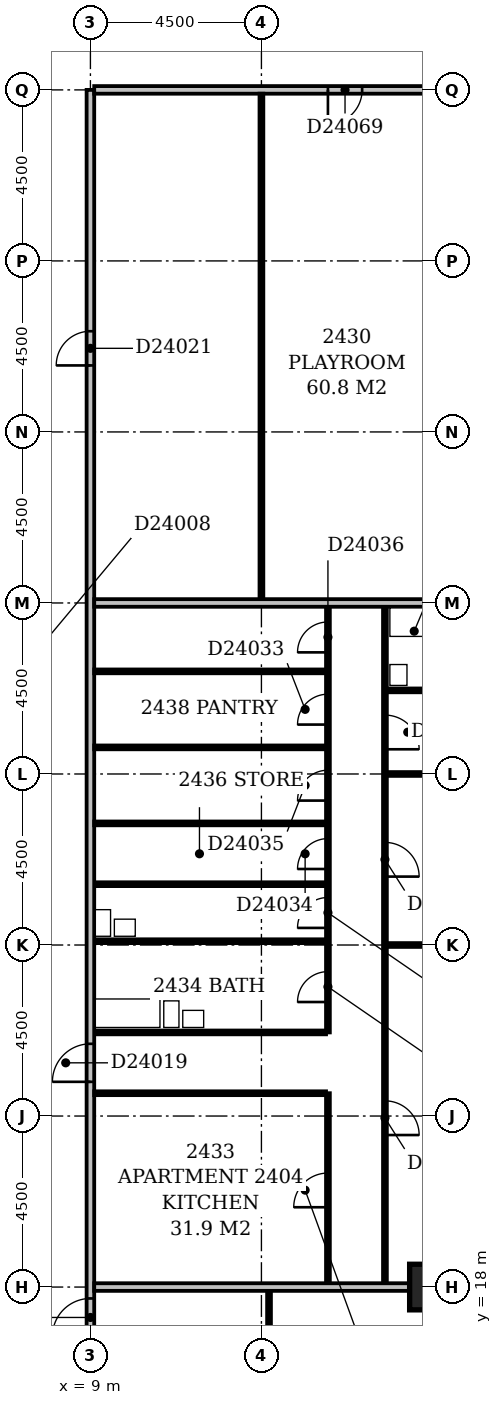
"""IFC4 building model, lengths in metres.
Left out: names, types, materials, properties, quantities, classifications, styles, units other than length and angle.
Written with IfcOpenShell. Run it as: python <this file> out.ifc"""

import sys

from ifc_helpers import new_model, si_unit, direction, frame, frame_2d, origin, origin_2d, place, context, subcontext, project, spatial, rectangle, extrude, element, fill, save


model = new_model("IFC4")
c1 = context("Model", 3, precision=1e-05, world=origin(), true_north=direction((0.0, 1.0)))
c2 = subcontext(c1, "Body", "Model", "MODEL_VIEW")
j1 = project(units=[si_unit("LENGTHUNIT", "METRE"), si_unit("PLANEANGLEUNIT", "RADIAN")], contexts=[c1])
p1 = place(None, origin())
s1 = spatial("IfcSite", under=j1, at=p1, CompositionType="ELEMENT")
p2 = place(p1, origin())
s2 = spatial("IfcBuilding", under=s1, at=p2, CompositionType="ELEMENT")
p3 = place(p2, frame((0.0, 0.0, 97.4)))
s3 = spatial("IfcBuildingStorey", under=s2, at=p3, CompositionType="ELEMENT", Elevation=97.4)
p4 = place(p3, frame((18.0, 18.0, -0.3), z_axis=(0.0, 0.0, 1.0), x_axis=(1.0, 0.0, 0.0)))
e1 = element("IfcColumn", 1, at=p4, inside=s3, PredefinedType="COLUMN", context=c2, shape_type="SweptSolid", body=[
    extrude(rectangle(XDim=1.2, YDim=1.2, at=origin_2d()), origin(), (0.0, 0.0, 1.0), 3.6),
])
p5 = place(p3, frame((9.0, 5.0, 0.0), z_axis=(0.0, 0.0, 1.0), x_axis=(0.0, 1.0, 0.0)))
e2 = element("IfcWall", 2, at=p5, inside=s3, PredefinedType="PARTITIONING", context=c2, shape_type="SweptSolid", body=[
    extrude(rectangle(XDim=44.5, YDim=0.2, at=frame_2d((22.25, 0.0))), origin(), (0.0, 0.0, 1.0), 3.3),
])
p6 = place(p5, frame((18.4, 0.0, 0.0)))
e3 = element("IfcOpeningElement", 3, at=p6, cuts=e2, PredefinedType="OPENING", context=c2, shape_type="SweptSolid", body=[
    extrude(rectangle(XDim=1.0, YDim=2.1, at=frame_2d((0.5, 1.05))), frame((0.0, 0.112, 0.0), z_axis=(0.0, -1.0, 0.0), x_axis=(1.0, 0.0, 0.0)), (0.0, 0.0, 1.0), 0.224),
])
p7 = place(p5, frame((11.7, 0.0, 0.0)))
e4 = element("IfcOpeningElement", 4, at=p7, cuts=e2, PredefinedType="OPENING", context=c2, shape_type="SweptSolid", body=[
    extrude(rectangle(XDim=1.0, YDim=2.1, at=frame_2d((0.5, 1.05))), frame((0.0, 0.112, 0.0), z_axis=(0.0, -1.0, 0.0), x_axis=(1.0, 0.0, 0.0)), (0.0, 0.0, 1.0), 0.224),
])
p8 = place(p5, frame((37.25, 0.0, 0.0)))
e5 = element("IfcOpeningElement", 5, at=p8, cuts=e2, PredefinedType="OPENING", context=c2, shape_type="SweptSolid", body=[
    extrude(rectangle(XDim=0.9, YDim=2.1, at=frame_2d((0.45, 1.05))), frame((0.0, 0.112, 0.0), z_axis=(0.0, -1.0, 0.0), x_axis=(1.0, 0.0, 0.0)), (0.0, 0.0, 1.0), 0.224),
])
p9 = place(p5, frame((1.5, 0.0, 0.0)))
e6 = element("IfcOpeningElement", 6, at=p9, cuts=e2, PredefinedType="OPENING", context=c2, shape_type="SweptSolid", body=[
    extrude(rectangle(XDim=0.9, YDim=2.1, at=frame_2d((0.45, 1.05))), frame((0.0, 0.112, 0.0), z_axis=(0.0, -1.0, 0.0), x_axis=(1.0, 0.0, 0.0)), (0.0, 0.0, 1.0), 0.224),
])
p10 = place(p3, frame((13.7, 9.6, 0.0), z_axis=(0.0, 0.0, 1.0), x_axis=(0.0, 1.0, 0.0)))
e7 = element("IfcWall", 7, at=p10, inside=s3, PredefinedType="PARTITIONING", context=c2, shape_type="SweptSolid", body=[
    extrude(rectangle(XDim=8.3, YDim=0.1, at=frame_2d((4.15, 0.0))), origin(), (0.0, 0.0, 1.0), 3.3),
])
p11 = place(p10, frame((1.2, 0.0, 0.0)))
e8 = element("IfcOpeningElement", 8, at=p11, cuts=e7, PredefinedType="OPENING", context=c2, shape_type="SweptSolid", body=[
    extrude(rectangle(XDim=0.9, YDim=2.1, at=frame_2d((0.45, 1.05))), frame((0.0, 0.062, 0.0), z_axis=(0.0, -1.0, 0.0), x_axis=(1.0, 0.0, 0.0)), (0.0, 0.0, 1.0), 0.124),
])
p12 = place(p10, frame((5.7, 0.0, 0.0)))
e9 = element("IfcOpeningElement", 9, at=p12, cuts=e7, PredefinedType="OPENING", context=c2, shape_type="SweptSolid", body=[
    extrude(rectangle(XDim=0.9, YDim=2.1, at=frame_2d((0.45, 1.05))), frame((0.0, 0.062, 0.0), z_axis=(0.0, -1.0, 0.0), x_axis=(1.0, 0.0, 0.0)), (0.0, 0.0, 1.0), 0.124),
])
p13 = place(p3, frame((9.1, 18.0, 0.0), z_axis=(0.0, 0.0, 1.0), x_axis=(1.0, 0.0, 0.0)))
e10 = element("IfcWall", 10, at=p13, inside=s3, PredefinedType="PARTITIONING", context=c2, shape_type="SweptSolid", body=[
    extrude(rectangle(XDim=8.3, YDim=0.2, at=frame_2d((4.15, 0.0))), origin(), (0.0, 0.0, 1.0), 2.6),
])
p14 = place(p3, frame((15.25, 18.1, 0.0), z_axis=(0.0, 0.0, 1.0), x_axis=(0.0, 1.0, 0.0)))
e11 = element("IfcWall", 11, at=p14, inside=s3, PredefinedType="PARTITIONING", context=c2, shape_type="SweptSolid", body=[
    extrude(rectangle(XDim=5.0, YDim=0.1, at=frame_2d((2.5, 0.0))), origin(), (0.0, 0.0, 1.0), 3.3),
])
p15 = place(p14, frame((2.0, 0.0, 0.0)))
e12 = element("IfcOpeningElement", 12, at=p15, cuts=e11, PredefinedType="OPENING", context=c2, shape_type="SweptSolid", body=[
    extrude(rectangle(XDim=0.9, YDim=2.1, at=frame_2d((0.45, 1.05))), frame((0.0, 0.062, 0.0), z_axis=(0.0, -1.0, 0.0), x_axis=(1.0, 0.0, 0.0)), (0.0, 0.0, 1.0), 0.124),
])
p16 = place(p3, frame((16.75, 18.1, 0.0), z_axis=(0.0, 0.0, 1.0), x_axis=(0.0, 1.0, 0.0)))
e13 = element("IfcWall", 13, at=p16, inside=s3, PredefinedType="PARTITIONING", context=c2, shape_type="SweptSolid", body=[
    extrude(rectangle(XDim=17.8, YDim=0.1, at=frame_2d((8.9, 0.0))), origin(), (0.0, 0.0, 1.0), 3.3),
])
p17 = place(p16, frame((3.9, 0.0, 0.0)))
e14 = element("IfcOpeningElement", 14, at=p17, cuts=e13, PredefinedType="OPENING", context=c2, shape_type="SweptSolid", body=[
    extrude(rectangle(XDim=0.9, YDim=2.1, at=frame_2d((0.45, 1.05))), frame((0.0, 0.062, 0.0), z_axis=(0.0, -1.0, 0.0), x_axis=(1.0, 0.0, 0.0)), (0.0, 0.0, 1.0), 0.124),
])
p18 = place(p16, frame((10.7, 0.0, 0.0)))
e15 = element("IfcOpeningElement", 15, at=p18, cuts=e13, PredefinedType="OPENING", context=c2, shape_type="SweptSolid", body=[
    extrude(rectangle(XDim=0.9, YDim=2.1, at=frame_2d((0.45, 1.05))), frame((0.0, 0.062, 0.0), z_axis=(0.0, -1.0, 0.0), x_axis=(1.0, 0.0, 0.0)), (0.0, 0.0, 1.0), 0.124),
])
p19 = place(p16, frame((14.05, 0.0, 0.0)))
e16 = element("IfcOpeningElement", 16, at=p19, cuts=e13, PredefinedType="OPENING", context=c2, shape_type="SweptSolid", body=[
    extrude(rectangle(XDim=0.9, YDim=2.1, at=frame_2d((0.45, 1.05))), frame((0.0, 0.062, 0.0), z_axis=(0.0, -1.0, 0.0), x_axis=(1.0, 0.0, 0.0)), (0.0, 0.0, 1.0), 0.124),
])
p20 = place(p3, frame((9.1, 23.1, 0.0), z_axis=(0.0, 0.0, 1.0), x_axis=(1.0, 0.0, 0.0)))
e17 = element("IfcWall", 17, at=p20, inside=s3, PredefinedType="PARTITIONING", context=c2, shape_type="SweptSolid", body=[
    extrude(rectangle(XDim=6.1, YDim=0.1, at=frame_2d((3.05, 0.0))), origin(), (0.0, 0.0, 1.0), 3.3),
])
p21 = place(p3, frame((9.1, 24.7, 0.0), z_axis=(0.0, 0.0, 1.0), x_axis=(1.0, 0.0, 0.0)))
e18 = element("IfcWall", 18, at=p21, inside=s3, PredefinedType="PLUMBINGWALL", context=c2, shape_type="SweptSolid", body=[
    extrude(rectangle(XDim=6.1, YDim=0.1, at=frame_2d((3.05, 0.0))), origin(), (0.0, 0.0, 1.0), 3.3),
])
p22 = place(p3, frame((15.25, 24.7, 0.0), z_axis=(0.0, 0.0, 1.0), x_axis=(0.0, 1.0, 0.0)))
e19 = element("IfcWall", 19, at=p22, inside=s3, PredefinedType="PARTITIONING", context=c2, shape_type="SweptSolid", body=[
    extrude(rectangle(XDim=11.2, YDim=0.1, at=frame_2d((5.6, 0.0))), origin(), (0.0, 0.0, 1.0), 3.3),
])
p23 = place(p22, frame((0.8, 0.0, 0.0)))
e20 = element("IfcOpeningElement", 20, at=p23, cuts=e19, PredefinedType="OPENING", context=c2, shape_type="SweptSolid", body=[
    extrude(rectangle(XDim=0.8, YDim=2.1, at=frame_2d((0.4, 1.05))), frame((0.0, 0.062, 0.0), z_axis=(0.0, -1.0, 0.0), x_axis=(1.0, 0.0, 0.0)), (0.0, 0.0, 1.0), 0.124),
])
p24 = place(p22, frame((8.1, 0.0, 0.0)))
e21 = element("IfcOpeningElement", 21, at=p24, cuts=e19, PredefinedType="OPENING", context=c2, shape_type="SweptSolid", body=[
    extrude(rectangle(XDim=0.8, YDim=2.1, at=frame_2d((0.4, 1.05))), frame((0.0, 0.062, 0.0), z_axis=(0.0, -1.0, 0.0), x_axis=(1.0, 0.0, 0.0)), (0.0, 0.0, 1.0), 0.124),
])
p25 = place(p22, frame((4.3, 0.0, 0.0)))
e22 = element("IfcOpeningElement", 22, at=p25, cuts=e19, PredefinedType="OPENING", context=c2, shape_type="SweptSolid", body=[
    extrude(rectangle(XDim=0.8, YDim=2.1, at=frame_2d((0.4, 1.05))), frame((0.0, 0.062, 0.0), z_axis=(0.0, -1.0, 0.0), x_axis=(1.0, 0.0, 0.0)), (0.0, 0.0, 1.0), 0.124),
])
p26 = place(p22, frame((6.1, 0.0, 0.0)))
e23 = element("IfcOpeningElement", 23, at=p26, cuts=e19, PredefinedType="OPENING", context=c2, shape_type="SweptSolid", body=[
    extrude(rectangle(XDim=0.8, YDim=2.1, at=frame_2d((0.4, 1.05))), frame((0.0, 0.062, 0.0), z_axis=(0.0, -1.0, 0.0), x_axis=(1.0, 0.0, 0.0)), (0.0, 0.0, 1.0), 0.124),
])
p27 = place(p22, frame((10.0, 0.0, 0.0)))
e24 = element("IfcOpeningElement", 24, at=p27, cuts=e19, PredefinedType="OPENING", context=c2, shape_type="SweptSolid", body=[
    extrude(rectangle(XDim=0.8, YDim=2.1, at=frame_2d((0.4, 1.05))), frame((0.0, 0.062, 0.0), z_axis=(0.0, -1.0, 0.0), x_axis=(1.0, 0.0, 0.0)), (0.0, 0.0, 1.0), 0.124),
])
p28 = place(p22, frame((2.75, 0.0, 0.0)))
e25 = element("IfcOpeningElement", 25, at=p28, cuts=e19, PredefinedType="OPENING", context=c2, shape_type="SweptSolid", body=[
    extrude(rectangle(XDim=0.8, YDim=2.1, at=frame_2d((0.4, 1.05))), frame((0.0, 0.062, 0.0), z_axis=(0.0, -1.0, 0.0), x_axis=(1.0, 0.0, 0.0)), (0.0, 0.0, 1.0), 0.124),
])
p29 = place(p3, frame((16.8, 27.0, 0.0), z_axis=(0.0, 0.0, 1.0), x_axis=(1.0, 0.0, 0.0)))
e26 = element("IfcWall", 26, at=p29, inside=s3, PredefinedType="PARTITIONING", context=c2, shape_type="SweptSolid", body=[
    extrude(rectangle(XDim=5.1, YDim=0.1, at=frame_2d((2.55, 0.0))), origin(), (0.0, 0.0, 1.0), 2.7),
])
p30 = place(p3, frame((9.1, 27.1, 0.0), z_axis=(0.0, 0.0, 1.0), x_axis=(1.0, 0.0, 0.0)))
e27 = element("IfcWall", 27, at=p30, inside=s3, PredefinedType="PLUMBINGWALL", context=c2, shape_type="SweptSolid", body=[
    extrude(rectangle(XDim=6.1, YDim=0.1, at=frame_2d((3.05, 0.0))), origin(), (0.0, 0.0, 1.0), 2.7),
])
p31 = place(p3, frame((9.1, 28.6, 0.0), z_axis=(0.0, 0.0, 1.0), x_axis=(1.0, 0.0, 0.0)))
e28 = element("IfcWall", 28, at=p31, inside=s3, PredefinedType="PLUMBINGWALL", context=c2, shape_type="SweptSolid", body=[
    extrude(rectangle(XDim=6.1, YDim=0.1, at=frame_2d((3.05, 0.0))), origin(), (0.0, 0.0, 1.0), 3.3),
])
p32 = place(p3, frame((9.1, 30.2, 0.0), z_axis=(0.0, 0.0, 1.0), x_axis=(1.0, 0.0, 0.0)))
e29 = element("IfcWall", 29, at=p32, inside=s3, PredefinedType="PARTITIONING", context=c2, shape_type="SweptSolid", body=[
    extrude(rectangle(XDim=6.1, YDim=0.1, at=frame_2d((3.05, 0.0))), origin(), (0.0, 0.0, 1.0), 3.3),
])
p33 = place(p3, frame((16.8, 31.5, 0.0), z_axis=(0.0, 0.0, 1.0), x_axis=(1.0, 0.0, 0.0)))
e30 = element("IfcWall", 30, at=p33, inside=s3, PredefinedType="PARTITIONING", context=c2, shape_type="SweptSolid", body=[
    extrude(rectangle(XDim=5.1, YDim=0.1, at=frame_2d((2.55, 0.0))), origin(), (0.0, 0.0, 1.0), 3.3),
])
p34 = place(p3, frame((9.1, 32.2, 0.0), z_axis=(0.0, 0.0, 1.0), x_axis=(1.0, 0.0, 0.0)))
e31 = element("IfcWall", 31, at=p34, inside=s3, PredefinedType="PARTITIONING", context=c2, shape_type="SweptSolid", body=[
    extrude(rectangle(XDim=6.1, YDim=0.1, at=frame_2d((3.05, 0.0))), origin(), (0.0, 0.0, 1.0), 3.3),
])
p35 = place(p3, frame((16.8, 33.7, 0.0), z_axis=(0.0, 0.0, 1.0), x_axis=(1.0, 0.0, 0.0)))
e32 = element("IfcWall", 32, at=p35, inside=s3, PredefinedType="PLUMBINGWALL", context=c2, shape_type="SweptSolid", body=[
    extrude(rectangle(XDim=2.8, YDim=0.1, at=frame_2d((1.4, 0.0))), origin(), (0.0, 0.0, 1.0), 3.3),
])
p36 = place(p35, frame((1.0, 0.0, 0.0)))
e33 = element("IfcOpeningElement", 33, at=p36, cuts=e32, PredefinedType="OPENING", context=c2, shape_type="SweptSolid", body=[
    extrude(rectangle(XDim=0.8, YDim=2.1, at=frame_2d((0.4, 1.05))), frame((0.0, 0.062, 0.0), z_axis=(0.0, -1.0, 0.0), x_axis=(1.0, 0.0, 0.0)), (0.0, 0.0, 1.0), 0.124),
])
p37 = place(p3, frame((9.1, 34.2, 0.0), z_axis=(0.0, 0.0, 1.0), x_axis=(1.0, 0.0, 0.0)))
e34 = element("IfcWall", 34, at=p37, inside=s3, PredefinedType="PARTITIONING", context=c2, shape_type="SweptSolid", body=[
    extrude(rectangle(XDim=6.1, YDim=0.1, at=frame_2d((3.05, 0.0))), origin(), (0.0, 0.0, 1.0), 3.3),
])
p38 = place(p3, frame((9.1, 36.0, 0.0), z_axis=(0.0, 0.0, 1.0), x_axis=(1.0, 0.0, 0.0)))
e35 = element("IfcWall", 35, at=p38, inside=s3, PredefinedType="PARTITIONING", context=c2, shape_type="SweptSolid", body=[
    extrude(rectangle(XDim=12.8, YDim=0.2, at=frame_2d((6.4, 0.0))), origin(), (0.0, 0.0, 1.0), 2.4),
])
p39 = place(p3, frame((13.5, 36.1, 0.0), z_axis=(0.0, 0.0, 1.0), x_axis=(0.0, 1.0, 0.0)))
e36 = element("IfcWall", 36, at=p39, inside=s3, PredefinedType="PARTITIONING", context=c2, shape_type="SweptSolid", body=[
    extrude(rectangle(XDim=13.3, YDim=0.1, at=frame_2d((6.65, 0.0))), origin(), (0.0, 0.0, 1.0), 3.3),
])
p40 = place(p3, frame((9.1, 49.5, 0.0), z_axis=(0.0, 0.0, 1.0), x_axis=(1.0, 0.0, 0.0)))
e37 = element("IfcWall", 37, at=p40, inside=s3, PredefinedType="PARTITIONING", context=c2, shape_type="SweptSolid", body=[
    extrude(rectangle(XDim=57.8, YDim=0.2, at=frame_2d((28.9, 0.0))), origin(), (0.0, 0.0, 1.0), 3.3),
])
p41 = place(p40, frame((13.7, 0.0, 0.0)))
e38 = element("IfcOpeningElement", 38, at=p41, cuts=e37, PredefinedType="OPENING", context=c2, shape_type="SweptSolid", body=[
    extrude(rectangle(XDim=1.0, YDim=2.1, at=frame_2d((0.5, 1.05))), frame((0.0, 0.112, 0.0), z_axis=(0.0, -1.0, 0.0), x_axis=(1.0, 0.0, 0.0)), (0.0, 0.0, 1.0), 0.224),
])
p42 = place(p40, frame((38.6, 0.0, 0.0)))
e39 = element("IfcOpeningElement", 39, at=p42, cuts=e37, PredefinedType="OPENING", context=c2, shape_type="SweptSolid", body=[
    extrude(rectangle(XDim=1.0, YDim=2.1, at=frame_2d((0.5, 1.05))), frame((0.0, 0.112, 0.0), z_axis=(0.0, -1.0, 0.0), x_axis=(1.0, 0.0, 0.0)), (0.0, 0.0, 1.0), 0.224),
])
p43 = place(p40, frame((52.1, 0.0, 0.0)))
e40 = element("IfcOpeningElement", 40, at=p43, cuts=e37, PredefinedType="OPENING", context=c2, shape_type="SweptSolid", body=[
    extrude(rectangle(XDim=1.0, YDim=2.1, at=frame_2d((0.5, 1.05))), frame((0.0, 0.112, 0.0), z_axis=(0.0, -1.0, 0.0), x_axis=(1.0, 0.0, 0.0)), (0.0, 0.0, 1.0), 0.224),
])
p44 = place(p40, frame((6.15, 0.0, 0.0)))
e41 = element("IfcOpeningElement", 41, at=p44, cuts=e37, PredefinedType="OPENING", context=c2, shape_type="SweptSolid", body=[
    extrude(rectangle(XDim=0.9, YDim=2.1, at=frame_2d((0.45, 1.05))), frame((0.0, 0.112, 0.0), z_axis=(0.0, -1.0, 0.0), x_axis=(1.0, 0.0, 0.0)), (0.0, 0.0, 1.0), 0.224),
])
p45 = place(p40, frame((10.65, 0.0, 0.0)))
e42 = element("IfcOpeningElement", 42, at=p45, cuts=e37, PredefinedType="OPENING", context=c2, shape_type="SweptSolid", body=[
    extrude(rectangle(XDim=0.9, YDim=2.1, at=frame_2d((0.45, 1.05))), frame((0.0, 0.112, 0.0), z_axis=(0.0, -1.0, 0.0), x_axis=(1.0, 0.0, 0.0)), (0.0, 0.0, 1.0), 0.224),
])
p46 = place(p6, origin())
e43 = element("IfcDoor", 43, at=p46, inside=s3, OperationType="SINGLE_SWING_LEFT", PredefinedType="DOOR", context=c2, shape_type="SweptSolid", body=[
    extrude(rectangle(XDim=1.0, YDim=2.1, at=frame_2d((0.5, 1.05))), frame((0.0, 0.025, 0.0), z_axis=(0.0, -1.0, 0.0), x_axis=(1.0, 0.0, 0.0)), (0.0, 0.0, 1.0), 0.05),
])
fill(e3, e43)
p47 = place(p7, origin())
e44 = element("IfcDoor", 44, at=p47, inside=s3, OperationType="SINGLE_SWING_LEFT", PredefinedType="DOOR", context=c2, shape_type="SweptSolid", body=[
    extrude(rectangle(XDim=1.0, YDim=2.1, at=frame_2d((0.5, 1.05))), frame((0.0, 0.025, 0.0), z_axis=(0.0, -1.0, 0.0), x_axis=(1.0, 0.0, 0.0)), (0.0, 0.0, 1.0), 0.05),
])
fill(e4, e44)
p48 = place(p8, origin())
e45 = element("IfcDoor", 45, at=p48, inside=s3, OperationType="SINGLE_SWING_LEFT", PredefinedType="DOOR", context=c2, shape_type="SweptSolid", body=[
    extrude(rectangle(XDim=0.9, YDim=2.1, at=frame_2d((0.45, 1.05))), frame((0.0, 0.025, 0.0), z_axis=(0.0, -1.0, 0.0), x_axis=(1.0, 0.0, 0.0)), (0.0, 0.0, 1.0), 0.05),
])
fill(e5, e45)
p49 = place(p15, origin())
e46 = element("IfcDoor", 46, at=p49, inside=s3, OperationType="SINGLE_SWING_LEFT", PredefinedType="DOOR", context=c2, shape_type="SweptSolid", body=[
    extrude(rectangle(XDim=0.9, YDim=2.1, at=frame_2d((0.45, 1.05))), frame((0.0, 0.025, 0.0), z_axis=(0.0, -1.0, 0.0), x_axis=(1.0, 0.0, 0.0)), (0.0, 0.0, 1.0), 0.05),
])
fill(e12, e46)
p50 = place(p17, frame((0.9, 0.0, 0.0), z_axis=(0.0, 0.0, 1.0), x_axis=(-1.0, 0.0, 0.0)))
e47 = element("IfcDoor", 47, at=p50, inside=s3, OperationType="SINGLE_SWING_RIGHT", PredefinedType="DOOR", context=c2, shape_type="SweptSolid", body=[
    extrude(rectangle(XDim=0.9, YDim=2.1, at=frame_2d((0.45, 1.05))), frame((0.0, 0.025, 0.0), z_axis=(0.0, -1.0, 0.0), x_axis=(1.0, 0.0, 0.0)), (0.0, 0.0, 1.0), 0.05),
])
fill(e14, e47)
p51 = place(p18, frame((0.9, 0.0, 0.0), z_axis=(0.0, 0.0, 1.0), x_axis=(-1.0, 0.0, 0.0)))
e48 = element("IfcDoor", 48, at=p51, inside=s3, OperationType="SINGLE_SWING_RIGHT", PredefinedType="DOOR", context=c2, shape_type="SweptSolid", body=[
    extrude(rectangle(XDim=0.9, YDim=2.1, at=frame_2d((0.45, 1.05))), frame((0.0, 0.025, 0.0), z_axis=(0.0, -1.0, 0.0), x_axis=(1.0, 0.0, 0.0)), (0.0, 0.0, 1.0), 0.05),
])
fill(e15, e48)
p52 = place(p19, frame((0.9, 0.0, 0.0), z_axis=(0.0, 0.0, 1.0), x_axis=(-1.0, 0.0, 0.0)))
e49 = element("IfcDoor", 49, at=p52, inside=s3, OperationType="SINGLE_SWING_RIGHT", PredefinedType="DOOR", context=c2, shape_type="SweptSolid", body=[
    extrude(rectangle(XDim=0.9, YDim=2.1, at=frame_2d((0.45, 1.05))), frame((0.0, 0.025, 0.0), z_axis=(0.0, -1.0, 0.0), x_axis=(1.0, 0.0, 0.0)), (0.0, 0.0, 1.0), 0.05),
])
fill(e16, e49)
p53 = place(p23, origin())
e50 = element("IfcDoor", 50, at=p53, inside=s3, OperationType="SINGLE_SWING_LEFT", PredefinedType="DOOR", context=c2, shape_type="SweptSolid", body=[
    extrude(rectangle(XDim=0.8, YDim=2.1, at=frame_2d((0.4, 1.05))), frame((0.0, 0.025, 0.0), z_axis=(0.0, -1.0, 0.0), x_axis=(1.0, 0.0, 0.0)), (0.0, 0.0, 1.0), 0.05),
])
fill(e20, e50)
p54 = place(p24, origin())
e51 = element("IfcDoor", 51, at=p54, inside=s3, OperationType="SINGLE_SWING_LEFT", PredefinedType="DOOR", context=c2, shape_type="SweptSolid", body=[
    extrude(rectangle(XDim=0.8, YDim=2.1, at=frame_2d((0.4, 1.05))), frame((0.0, 0.025, 0.0), z_axis=(0.0, -1.0, 0.0), x_axis=(1.0, 0.0, 0.0)), (0.0, 0.0, 1.0), 0.05),
])
fill(e21, e51)
p55 = place(p25, origin())
e52 = element("IfcDoor", 52, at=p55, inside=s3, OperationType="SINGLE_SWING_LEFT", PredefinedType="DOOR", context=c2, shape_type="SweptSolid", body=[
    extrude(rectangle(XDim=0.8, YDim=2.1, at=frame_2d((0.4, 1.05))), frame((0.0, 0.025, 0.0), z_axis=(0.0, -1.0, 0.0), x_axis=(1.0, 0.0, 0.0)), (0.0, 0.0, 1.0), 0.05),
])
fill(e22, e52)
p56 = place(p26, origin())
e53 = element("IfcDoor", 53, at=p56, inside=s3, OperationType="SINGLE_SWING_LEFT", PredefinedType="DOOR", context=c2, shape_type="SweptSolid", body=[
    extrude(rectangle(XDim=0.8, YDim=2.1, at=frame_2d((0.4, 1.05))), frame((0.0, 0.025, 0.0), z_axis=(0.0, -1.0, 0.0), x_axis=(1.0, 0.0, 0.0)), (0.0, 0.0, 1.0), 0.05),
])
fill(e23, e53)
p57 = place(p27, origin())
e54 = element("IfcDoor", 54, at=p57, inside=s3, OperationType="SINGLE_SWING_LEFT", PredefinedType="DOOR", context=c2, shape_type="SweptSolid", body=[
    extrude(rectangle(XDim=0.8, YDim=2.1, at=frame_2d((0.4, 1.05))), frame((0.0, 0.025, 0.0), z_axis=(0.0, -1.0, 0.0), x_axis=(1.0, 0.0, 0.0)), (0.0, 0.0, 1.0), 0.05),
])
fill(e24, e54)
p58 = place(p28, origin())
e55 = element("IfcDoor", 55, at=p58, inside=s3, OperationType="SINGLE_SWING_LEFT", PredefinedType="DOOR", context=c2, shape_type="SweptSolid", body=[
    extrude(rectangle(XDim=0.8, YDim=2.1, at=frame_2d((0.4, 1.05))), frame((0.0, 0.025, 0.0), z_axis=(0.0, -1.0, 0.0), x_axis=(1.0, 0.0, 0.0)), (0.0, 0.0, 1.0), 0.05),
])
fill(e25, e55)
p59 = place(p44, frame((0.9, 0.0, 0.0), z_axis=(0.0, 0.0, 1.0), x_axis=(-1.0, 0.0, 0.0)))
e56 = element("IfcDoor", 56, at=p59, inside=s3, OperationType="SINGLE_SWING_RIGHT", PredefinedType="DOOR", context=c2, shape_type="SweptSolid", body=[
    extrude(rectangle(XDim=0.9, YDim=2.1, at=frame_2d((0.45, 1.05))), frame((0.0, 0.025, 0.0), z_axis=(0.0, -1.0, 0.0), x_axis=(1.0, 0.0, 0.0)), (0.0, 0.0, 1.0), 0.05),
])
fill(e41, e56)
save(model, sys.argv[1])
